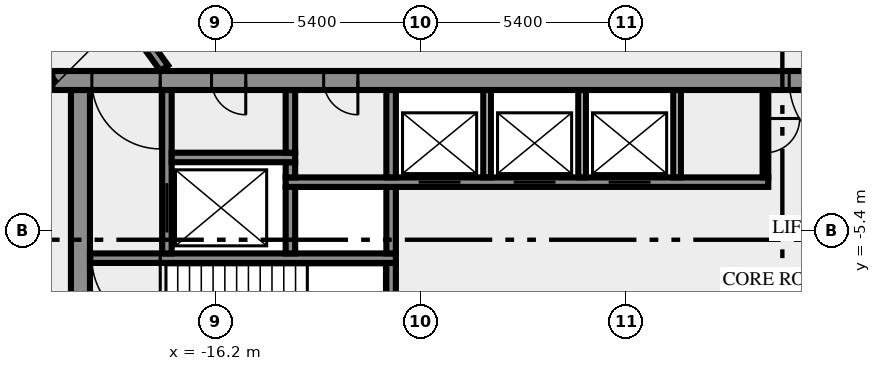
"""IFC4 building model, lengths in metres.
Left out: names, types, materials, properties, quantities, classifications, styles, units other than length and angle.
Written with IfcOpenShell. Run it as: python <this file> out.ifc"""

import sys

from ifc_helpers import new_model, si_unit, direction, frame, frame_2d, origin, place, context, subcontext, project, spatial, rectangle, extrude, element, fill, save


model = new_model("IFC4")
c1 = context("Model", 3, precision=1e-05, world=origin(), true_north=direction((0.0, 1.0)))
c2 = subcontext(c1, "Body", "Model", "MODEL_VIEW")
j1 = project(units=[si_unit("LENGTHUNIT", "METRE"), si_unit("PLANEANGLEUNIT", "RADIAN")], contexts=[c1])
p1 = place(None, origin())
s1 = spatial("IfcSite", under=j1, at=p1, CompositionType="ELEMENT")
p2 = place(p1, origin())
s2 = spatial("IfcBuilding", under=s1, at=p2, CompositionType="ELEMENT")
p3 = place(p2, frame((0.0, 0.0, 47.0)))
s3 = spatial("IfcBuildingStorey", under=s2, at=p3, CompositionType="ELEMENT", Elevation=47.0)
p4 = place(p3, frame((-19.75, -10.5, 0.0), z_axis=(0.0, 0.0, 1.0), x_axis=(0.0, 1.0, 0.0)))
e1 = element("IfcWall", 1, at=p4, inside=s3, PredefinedType="SHEAR", context=c2, shape_type="SweptSolid", body=[
    extrude(rectangle(XDim=8.8, YDim=0.5, at=frame_2d((4.4, 0.0))), origin(), (0.0, 0.0, 1.0), 3.65),
])
p5 = place(p3, frame((-11.575, -7.25, 0.0), z_axis=(0.0, 0.0, 1.0), x_axis=(0.0, 1.0, 0.0)))
e2 = element("IfcWall", 2, at=p5, inside=s3, PredefinedType="SHEAR", context=c2, shape_type="SweptSolid", body=[
    extrude(rectangle(XDim=1.0, YDim=0.25, at=frame_2d((0.5, 0.0))), origin(), (0.0, 0.0, 1.0), 3.65),
])
p6 = place(p3, frame((-11.45, -6.125, 0.0), z_axis=(0.0, 0.0, 1.0), x_axis=(-1.0, 0.0, 0.0)))
e3 = element("IfcWall", 3, at=p6, inside=s3, PredefinedType="SHEAR", context=c2, shape_type="SweptSolid", body=[
    extrude(rectangle(XDim=8.05, YDim=0.25, at=frame_2d((4.025, 0.0))), origin(), (0.0, 0.0, 1.0), 3.65),
])
p7 = place(p6, frame((6.2, 0.0, 0.0)))
e4 = element("IfcOpeningElement", 4, at=p7, cuts=e3, PredefinedType="OPENING", context=c2, shape_type="SweptSolid", body=[
    extrude(rectangle(XDim=1.8, YDim=2.1, at=frame_2d((0.9, 1.05))), frame((0.0, 0.135, 0.0), z_axis=(0.0, -1.0, 0.0), x_axis=(1.0, 0.0, 0.0)), (0.0, 0.0, 1.0), 0.27),
])
p8 = place(p3, frame((-17.475, -6.0, 0.0), z_axis=(0.0, 0.0, 1.0), x_axis=(0.0, 1.0, 0.0)))
e5 = element("IfcWall", 5, at=p8, inside=s3, PredefinedType="SHEAR", context=c2, shape_type="SweptSolid", body=[
    extrude(rectangle(XDim=4.3, YDim=0.25, at=frame_2d((2.15, 0.0))), origin(), (0.0, 0.0, 1.0), 3.65),
])
p9 = place(p8, frame((0.55, 0.0, 0.0)))
e6 = element("IfcOpeningElement", 6, at=p9, cuts=e5, PredefinedType="OPENING", context=c2, shape_type="SweptSolid", body=[
    extrude(rectangle(XDim=1.3, YDim=2.1, at=frame_2d((0.65, 1.05))), frame((0.0, 0.135, 0.0), z_axis=(0.0, -1.0, 0.0), x_axis=(1.0, 0.0, 0.0)), (0.0, 0.0, 1.0), 0.27),
])
for number, where, z_axis, x_axis in (
    (7, (-14.225, -6.0, 0.0), (0.0, 0.0, 1.0), (0.0, 1.0, 0.0)),
    (8, (-11.575, -6.0, 0.0), (0.0, 0.0, 1.0), (0.0, 1.0, 0.0)),
):
    element("IfcWall", number, at=place(p3, frame(where, z_axis=z_axis, x_axis=x_axis)), inside=s3, PredefinedType="SHEAR", context=c2, shape_type="SweptSolid", body=[
        extrude(rectangle(XDim=1.75, YDim=0.25, at=frame_2d((0.875, 0.0))), origin(), (0.0, 0.0, 1.0), 3.65),
    ])
p10 = place(p3, frame((-14.35, -4.125, 0.0), z_axis=(0.0, 0.0, 1.0), x_axis=(1.0, 0.0, 0.0)))
e9 = element("IfcWall", 9, at=p10, inside=s3, PredefinedType="SHEAR", context=c2, shape_type="SweptSolid", body=[
    extrude(rectangle(XDim=12.7, YDim=0.25, at=frame_2d((6.35, 0.0))), origin(), (0.0, 0.0, 1.0), 3.65),
])
p11 = place(p10, frame((3.5, 0.0, 0.0)))
e10 = element("IfcOpeningElement", 10, at=p11, cuts=e9, PredefinedType="OPENING", context=c2, shape_type="SweptSolid", body=[
    extrude(rectangle(XDim=1.1, YDim=2.1, at=frame_2d((0.55, 1.05))), frame((0.0, 0.135, 0.0), z_axis=(0.0, -1.0, 0.0), x_axis=(1.0, 0.0, 0.0)), (0.0, 0.0, 1.0), 0.27),
])
p12 = place(p10, frame((6.0, 0.0, 0.0)))
e11 = element("IfcOpeningElement", 11, at=p12, cuts=e9, PredefinedType="OPENING", context=c2, shape_type="SweptSolid", body=[
    extrude(rectangle(XDim=1.1, YDim=2.1, at=frame_2d((0.55, 1.05))), frame((0.0, 0.135, 0.0), z_axis=(0.0, -1.0, 0.0), x_axis=(1.0, 0.0, 0.0)), (0.0, 0.0, 1.0), 0.27),
])
p13 = place(p10, frame((8.5, 0.0, 0.0)))
e12 = element("IfcOpeningElement", 12, at=p13, cuts=e9, PredefinedType="OPENING", context=c2, shape_type="SweptSolid", body=[
    extrude(rectangle(XDim=1.1, YDim=2.1, at=frame_2d((0.55, 1.05))), frame((0.0, 0.135, 0.0), z_axis=(0.0, -1.0, 0.0), x_axis=(1.0, 0.0, 0.0)), (0.0, 0.0, 1.0), 0.27),
])
p14 = place(p3, frame((-14.225, -4.0, 0.0), z_axis=(0.0, 0.0, 1.0), x_axis=(0.0, 1.0, 0.0)))
e13 = element("IfcWall", 13, at=p14, inside=s3, PredefinedType="SHEAR", context=c2, shape_type="SweptSolid", body=[
    extrude(rectangle(XDim=0.4, YDim=0.25, at=frame_2d((0.2, 0.0))), origin(), (0.0, 0.0, 1.0), 3.65),
])
p15 = place(p3, frame((-11.575, -4.0, 0.0), z_axis=(0.0, 0.0, 1.0), x_axis=(0.0, 1.0, 0.0)))
e14 = element("IfcWall", 14, at=p15, inside=s3, PredefinedType="SHEAR", context=c2, shape_type="SweptSolid", body=[
    extrude(rectangle(XDim=2.3, YDim=0.25, at=frame_2d((1.15, 0.0))), origin(), (0.0, 0.0, 1.0), 3.65),
])
for number, where, z_axis, x_axis in (
    (15, (-9.05, -4.0, 0.0), (0.0, 0.0, 1.0), (0.0, 1.0, 0.0)),
    (16, (-6.55, -4.0, 0.0), (0.0, 0.0, 1.0), (0.0, 1.0, 0.0)),
    (17, (-4.05, -4.0, 0.0), (0.0, 0.0, 1.0), (0.0, 1.0, 0.0)),
):
    element("IfcWall", number, at=place(p3, frame(where, z_axis=z_axis, x_axis=x_axis)), inside=s3, PredefinedType="SOLIDWALL", context=c2, shape_type="SweptSolid", body=[
        extrude(rectangle(XDim=2.3, YDim=0.2, at=frame_2d((1.15, 0.0))), origin(), (0.0, 0.0, 1.0), 3.65),
    ])
p16 = place(p3, frame((-1.725, -1.7, 0.0), z_axis=(0.0, 0.0, 1.0), x_axis=(0.0, -1.0, 0.0)))
e18 = element("IfcWall", 18, at=p16, inside=s3, PredefinedType="PARTITIONING", context=c2, shape_type="SweptSolid", body=[
    extrude(rectangle(XDim=2.3, YDim=0.15, at=frame_2d((1.15, 0.0))), origin(), (0.0, 0.0, 1.0), 3.65),
])
p17 = place(p16, frame((0.75, 0.0, 0.0)))
e19 = element("IfcOpeningElement", 19, at=p17, cuts=e18, PredefinedType="OPENING", context=c2, shape_type="SweptSolid", body=[
    extrude(rectangle(XDim=0.9, YDim=2.1, at=frame_2d((0.45, 1.05))), frame((0.0, 0.085, 0.0), z_axis=(0.0, -1.0, 0.0), x_axis=(1.0, 0.0, 0.0)), (0.0, 0.0, 1.0), 0.17),
])
p18 = place(p3, frame((-17.35, -3.475, 0.0), z_axis=(0.0, 0.0, 1.0), x_axis=(1.0, 0.0, 0.0)))
e20 = element("IfcWall", 20, at=p18, inside=s3, PredefinedType="SHEAR", context=c2, shape_type="SweptSolid", body=[
    extrude(rectangle(XDim=3.25, YDim=0.25, at=frame_2d((1.625, 0.0))), origin(), (0.0, 0.0, 1.0), 3.65),
])
p19 = place(p3, frame((-14.225, -3.35, 0.0), z_axis=(0.0, 0.0, 1.0), x_axis=(0.0, 1.0, 0.0)))
e21 = element("IfcWall", 21, at=p19, inside=s3, PredefinedType="SHEAR", context=c2, shape_type="SweptSolid", body=[
    extrude(rectangle(XDim=1.65, YDim=0.25, at=frame_2d((0.825, 0.0))), origin(), (0.0, 0.0, 1.0), 3.65),
])
p20 = place(p3, frame((20.49, -1.45, 0.0), z_axis=(0.0, 0.0, 1.0), x_axis=(-1.0, 0.0, 0.0)))
e22 = element("IfcWall", 22, at=p20, inside=s3, PredefinedType="SHEAR", context=c2, shape_type="SweptSolid", body=[
    extrude(rectangle(XDim=40.98, YDim=0.5, at=frame_2d((20.49, 0.0))), origin(), (0.0, 0.0, 1.0), 3.65),
])
p21 = place(p20, frame((38.14, 0.0, 0.0)))
e23 = element("IfcOpeningElement", 23, at=p21, cuts=e22, PredefinedType="OPENING", context=c2, shape_type="SweptSolid", body=[
    extrude(rectangle(XDim=1.8, YDim=2.1, at=frame_2d((0.9, 1.05))), frame((0.0, 0.26, 0.0), z_axis=(0.0, -1.0, 0.0), x_axis=(1.0, 0.0, 0.0)), (0.0, 0.0, 1.0), 0.52),
])
p22 = place(p20, frame((35.89, 0.0, 0.0)))
e24 = element("IfcOpeningElement", 24, at=p22, cuts=e22, PredefinedType="OPENING", context=c2, shape_type="SweptSolid", body=[
    extrude(rectangle(XDim=0.9, YDim=2.1, at=frame_2d((0.45, 1.05))), frame((0.0, 0.26, 0.0), z_axis=(0.0, -1.0, 0.0), x_axis=(1.0, 0.0, 0.0)), (0.0, 0.0, 1.0), 0.52),
])
p23 = place(p20, frame((32.94, 0.0, 0.0)))
e25 = element("IfcOpeningElement", 25, at=p23, cuts=e22, PredefinedType="OPENING", context=c2, shape_type="SweptSolid", body=[
    extrude(rectangle(XDim=0.9, YDim=2.1, at=frame_2d((0.45, 1.05))), frame((0.0, 0.26, 0.0), z_axis=(0.0, -1.0, 0.0), x_axis=(1.0, 0.0, 0.0)), (0.0, 0.0, 1.0), 0.52),
])
p24 = place(p20, frame((19.59, 0.0, 0.0)))
e26 = element("IfcOpeningElement", 26, at=p24, cuts=e22, PredefinedType="OPENING", context=c2, shape_type="SweptSolid", body=[
    extrude(rectangle(XDim=2.0, YDim=2.1, at=frame_2d((1.0, 1.05))), frame((0.0, 0.26, 0.0), z_axis=(0.0, -1.0, 0.0), x_axis=(1.0, 0.0, 0.0)), (0.0, 0.0, 1.0), 0.52),
])
p25 = place(p20, frame((7.14, 0.0, 0.0)))
e27 = element("IfcOpeningElement", 27, at=p25, cuts=e22, PredefinedType="OPENING", context=c2, shape_type="SweptSolid", body=[
    extrude(rectangle(XDim=0.9, YDim=2.1, at=frame_2d((0.45, 1.05))), frame((0.0, 0.26, 0.0), z_axis=(0.0, -1.0, 0.0), x_axis=(1.0, 0.0, 0.0)), (0.0, 0.0, 1.0), 0.52),
])
p26 = place(p20, frame((5.028, 0.0, 0.0)))
e28 = element("IfcOpeningElement", 28, at=p26, cuts=e22, PredefinedType="OPENING", context=c2, shape_type="SweptSolid", body=[
    extrude(rectangle(XDim=0.8, YDim=2.1, at=frame_2d((0.4, 1.05))), frame((0.0, 0.26, 0.0), z_axis=(0.0, -1.0, 0.0), x_axis=(1.0, 0.0, 0.0)), (0.0, 0.0, 1.0), 0.52),
])
p27 = place(p20, frame((3.452, 0.0, 0.0)))
e29 = element("IfcOpeningElement", 29, at=p27, cuts=e22, PredefinedType="OPENING", context=c2, shape_type="SweptSolid", body=[
    extrude(rectangle(XDim=0.8, YDim=2.1, at=frame_2d((0.4, 1.05))), frame((0.0, 0.26, 0.0), z_axis=(0.0, -1.0, 0.0), x_axis=(1.0, 0.0, 0.0)), (0.0, 0.0, 1.0), 0.52),
])
p28 = place(p20, frame((1.04, 0.0, 0.0)))
e30 = element("IfcOpeningElement", 30, at=p28, cuts=e22, PredefinedType="OPENING", context=c2, shape_type="SweptSolid", body=[
    extrude(rectangle(XDim=1.8, YDim=2.1, at=frame_2d((0.9, 1.05))), frame((0.0, 0.26, 0.0), z_axis=(0.0, -1.0, 0.0), x_axis=(1.0, 0.0, 0.0)), (0.0, 0.0, 1.0), 0.52),
])
p29 = place(p3, frame((-20.531, -1.523, 0.0), z_axis=(0.0, 0.0, 1.0), x_axis=(-0.587784593204, 0.809017473231, 0.0)))
e31 = element("IfcWall", 31, at=p29, inside=s3, PredefinedType="SOLIDWALL", context=c2, shape_type="SweptSolid", body=[
    extrude(rectangle(XDim=44.67, YDim=0.25, at=frame_2d((22.335, 0.0))), origin(), (0.0, 0.0, 1.0), 3.65),
])
p30 = place(p29, frame((26.14, 0.0, 0.0)))
e32 = element("IfcOpeningElement", 32, at=p30, cuts=e31, PredefinedType="OPENING", context=c2, shape_type="SweptSolid", body=[
    extrude(rectangle(XDim=1.8, YDim=2.1, at=frame_2d((0.9, 1.05))), frame((0.0, 0.135, 0.0), z_axis=(0.0, -1.0, 0.0), x_axis=(1.0, 0.0, 0.0)), (0.0, 0.0, 1.0), 0.27),
])
p31 = place(p29, frame((43.296, 0.0, 0.0)))
e33 = element("IfcOpeningElement", 33, at=p31, cuts=e31, PredefinedType="OPENING", context=c2, shape_type="SweptSolid", body=[
    extrude(rectangle(XDim=0.9, YDim=2.1, at=frame_2d((0.45, 1.05))), frame((0.0, 0.135, 0.0), z_axis=(0.0, -1.0, 0.0), x_axis=(1.0, 0.0, 0.0)), (0.0, 0.0, 1.0), 0.27),
])
p32 = place(p29, frame((13.216, 0.0, 0.0)))
e34 = element("IfcOpeningElement", 34, at=p32, cuts=e31, PredefinedType="OPENING", context=c2, shape_type="SweptSolid", body=[
    extrude(rectangle(XDim=0.9, YDim=2.1, at=frame_2d((0.45, 1.05))), frame((0.0, 0.135, 0.0), z_axis=(0.0, -1.0, 0.0), x_axis=(1.0, 0.0, 0.0)), (0.0, 0.0, 1.0), 0.27),
])
p33 = place(p29, frame((7.816, 0.0, 0.0)))
e35 = element("IfcOpeningElement", 35, at=p33, cuts=e31, PredefinedType="OPENING", context=c2, shape_type="SweptSolid", body=[
    extrude(rectangle(XDim=0.9, YDim=2.1, at=frame_2d((0.45, 1.05))), frame((0.0, 0.135, 0.0), z_axis=(0.0, -1.0, 0.0), x_axis=(1.0, 0.0, 0.0)), (0.0, 0.0, 1.0), 0.27),
])
p34 = place(p29, frame((0.533, 0.0, 0.0)))
e36 = element("IfcOpeningElement", 36, at=p34, cuts=e31, PredefinedType="OPENING", context=c2, shape_type="SweptSolid", body=[
    extrude(rectangle(XDim=0.9, YDim=2.1, at=frame_2d((0.45, 1.05))), frame((0.0, 0.135, 0.0), z_axis=(0.0, -1.0, 0.0), x_axis=(1.0, 0.0, 0.0)), (0.0, 0.0, 1.0), 0.27),
])
p35 = place(p3, frame((-37.232, 25.972, 0.0), z_axis=(0.0, 0.0, 1.0), x_axis=(0.587786323093, -0.809016216391, 0.0)))
e37 = element("IfcWall", 37, at=p35, inside=s3, PredefinedType="SOLIDWALL", context=c2, shape_type="SweptSolid", body=[
    extrude(rectangle(XDim=33.493, YDim=0.25, at=frame_2d((16.747, 0.0))), origin(), (0.0, 0.0, 1.0), 3.65),
])
p36 = place(p35, frame((2.935, 0.0, 0.0)))
e38 = element("IfcOpeningElement", 38, at=p36, cuts=e37, PredefinedType="OPENING", context=c2, shape_type="SweptSolid", body=[
    extrude(rectangle(XDim=0.9, YDim=2.1, at=frame_2d((0.45, 1.05))), frame((0.0, 0.135, 0.0), z_axis=(0.0, -1.0, 0.0), x_axis=(1.0, 0.0, 0.0)), (0.0, 0.0, 1.0), 0.27),
])
p37 = place(p35, frame((16.435, 0.0, 0.0)))
e39 = element("IfcOpeningElement", 39, at=p37, cuts=e37, PredefinedType="OPENING", context=c2, shape_type="SweptSolid", body=[
    extrude(rectangle(XDim=0.9, YDim=2.1, at=frame_2d((0.45, 1.05))), frame((0.0, 0.135, 0.0), z_axis=(0.0, -1.0, 0.0), x_axis=(1.0, 0.0, 0.0)), (0.0, 0.0, 1.0), 0.27),
])
p38 = place(p35, frame((29.152, 0.0, 0.0)))
e40 = element("IfcOpeningElement", 40, at=p38, cuts=e37, PredefinedType="OPENING", context=c2, shape_type="SweptSolid", body=[
    extrude(rectangle(XDim=0.9, YDim=2.1, at=frame_2d((0.45, 1.05))), frame((0.0, 0.135, 0.0), z_axis=(0.0, -1.0, 0.0), x_axis=(1.0, 0.0, 0.0)), (0.0, 0.0, 1.0), 0.27),
])
p39 = place(p35, frame((14.536, 0.0, 0.0)))
e41 = element("IfcOpeningElement", 41, at=p39, cuts=e37, PredefinedType="OPENING", context=c2, shape_type="SweptSolid", body=[
    extrude(rectangle(XDim=1.2, YDim=2.1, at=frame_2d((0.6, 1.05))), frame((0.0, 0.135, 0.0), z_axis=(0.0, -1.0, 0.0), x_axis=(1.0, 0.0, 0.0)), (0.0, 0.0, 1.0), 0.27),
])
p40 = place(p35, frame((1.335, 0.0, 0.0)))
e42 = element("IfcOpeningElement", 42, at=p40, cuts=e37, PredefinedType="OPENING", context=c2, shape_type="SweptSolid", body=[
    extrude(rectangle(XDim=0.9, YDim=2.1, at=frame_2d((0.45, 1.05))), frame((0.0, 0.135, 0.0), z_axis=(0.0, -1.0, 0.0), x_axis=(1.0, 0.0, 0.0)), (0.0, 0.0, 1.0), 0.27),
])
p41 = place(p7, origin())
e43 = element("IfcDoor", 43, at=p41, inside=s3, OperationType="DOUBLE_DOOR_SINGLE_SWING", PredefinedType="DOOR", context=c2, shape_type="SweptSolid", body=[
    extrude(rectangle(XDim=1.8, YDim=2.1, at=frame_2d((0.9, 1.05))), frame((0.0, 0.025, 0.0), z_axis=(0.0, -1.0, 0.0), x_axis=(1.0, 0.0, 0.0)), (0.0, 0.0, 1.0), 0.05),
])
fill(e4, e43)
p42 = place(p9, origin())
e44 = element("IfcDoor", 44, at=p42, inside=s3, OperationType="DOUBLE_DOOR_SLIDING", PredefinedType="DOOR", context=c2, shape_type="SweptSolid", body=[
    extrude(rectangle(XDim=1.3, YDim=2.1, at=frame_2d((0.65, 1.05))), frame((0.0, 0.025, 0.0), z_axis=(0.0, -1.0, 0.0), x_axis=(1.0, 0.0, 0.0)), (0.0, 0.0, 1.0), 0.05),
])
fill(e6, e44)
p43 = place(p11, origin())
e45 = element("IfcDoor", 45, at=p43, inside=s3, OperationType="DOUBLE_DOOR_SLIDING", PredefinedType="DOOR", context=c2, shape_type="SweptSolid", body=[
    extrude(rectangle(XDim=1.1, YDim=2.1, at=frame_2d((0.55, 1.05))), frame((0.0, 0.025, 0.0), z_axis=(0.0, -1.0, 0.0), x_axis=(1.0, 0.0, 0.0)), (0.0, 0.0, 1.0), 0.05),
])
fill(e10, e45)
p44 = place(p12, origin())
e46 = element("IfcDoor", 46, at=p44, inside=s3, OperationType="DOUBLE_DOOR_SLIDING", PredefinedType="DOOR", context=c2, shape_type="SweptSolid", body=[
    extrude(rectangle(XDim=1.1, YDim=2.1, at=frame_2d((0.55, 1.05))), frame((0.0, 0.025, 0.0), z_axis=(0.0, -1.0, 0.0), x_axis=(1.0, 0.0, 0.0)), (0.0, 0.0, 1.0), 0.05),
])
fill(e11, e46)
p45 = place(p13, origin())
e47 = element("IfcDoor", 47, at=p45, inside=s3, OperationType="DOUBLE_DOOR_SLIDING", PredefinedType="DOOR", context=c2, shape_type="SweptSolid", body=[
    extrude(rectangle(XDim=1.1, YDim=2.1, at=frame_2d((0.55, 1.05))), frame((0.0, 0.025, 0.0), z_axis=(0.0, -1.0, 0.0), x_axis=(1.0, 0.0, 0.0)), (0.0, 0.0, 1.0), 0.05),
])
fill(e12, e47)
p46 = place(p17, origin())
e48 = element("IfcDoor", 48, at=p46, inside=s3, OperationType="SINGLE_SWING_RIGHT", PredefinedType="DOOR", context=c2, shape_type="SweptSolid", body=[
    extrude(rectangle(XDim=0.9, YDim=2.1, at=frame_2d((0.45, 1.05))), frame((0.0, 0.025, 0.0), z_axis=(0.0, -1.0, 0.0), x_axis=(1.0, 0.0, 0.0)), (0.0, 0.0, 1.0), 0.05),
])
fill(e19, e48)
p47 = place(p21, origin())
e49 = element("IfcDoor", 49, at=p47, inside=s3, OperationType="DOUBLE_DOOR_SINGLE_SWING", PredefinedType="DOOR", context=c2, shape_type="SweptSolid", body=[
    extrude(rectangle(XDim=1.8, YDim=2.1, at=frame_2d((0.9, 1.05))), frame((0.0, 0.025, 0.0), z_axis=(0.0, -1.0, 0.0), x_axis=(1.0, 0.0, 0.0)), (0.0, 0.0, 1.0), 0.05),
])
fill(e23, e49)
p48 = place(p22, origin())
e50 = element("IfcDoor", 50, at=p48, inside=s3, OperationType="SINGLE_SWING_RIGHT", PredefinedType="DOOR", context=c2, shape_type="SweptSolid", body=[
    extrude(rectangle(XDim=0.9, YDim=2.1, at=frame_2d((0.45, 1.05))), frame((0.0, 0.025, 0.0), z_axis=(0.0, -1.0, 0.0), x_axis=(1.0, 0.0, 0.0)), (0.0, 0.0, 1.0), 0.05),
])
fill(e24, e50)
p49 = place(p23, origin())
e51 = element("IfcDoor", 51, at=p49, inside=s3, OperationType="SINGLE_SWING_RIGHT", PredefinedType="DOOR", context=c2, shape_type="SweptSolid", body=[
    extrude(rectangle(XDim=0.9, YDim=2.1, at=frame_2d((0.45, 1.05))), frame((0.0, 0.025, 0.0), z_axis=(0.0, -1.0, 0.0), x_axis=(1.0, 0.0, 0.0)), (0.0, 0.0, 1.0), 0.05),
])
fill(e25, e51)
p50 = place(p24, origin())
e52 = element("IfcDoor", 52, at=p50, inside=s3, OperationType="DOUBLE_DOOR_SINGLE_SWING", PredefinedType="DOOR", context=c2, shape_type="SweptSolid", body=[
    extrude(rectangle(XDim=2.0, YDim=2.1, at=frame_2d((1.0, 1.05))), frame((0.0, 0.025, 0.0), z_axis=(0.0, -1.0, 0.0), x_axis=(1.0, 0.0, 0.0)), (0.0, 0.0, 1.0), 0.05),
])
fill(e26, e52)
save(model, sys.argv[1])
